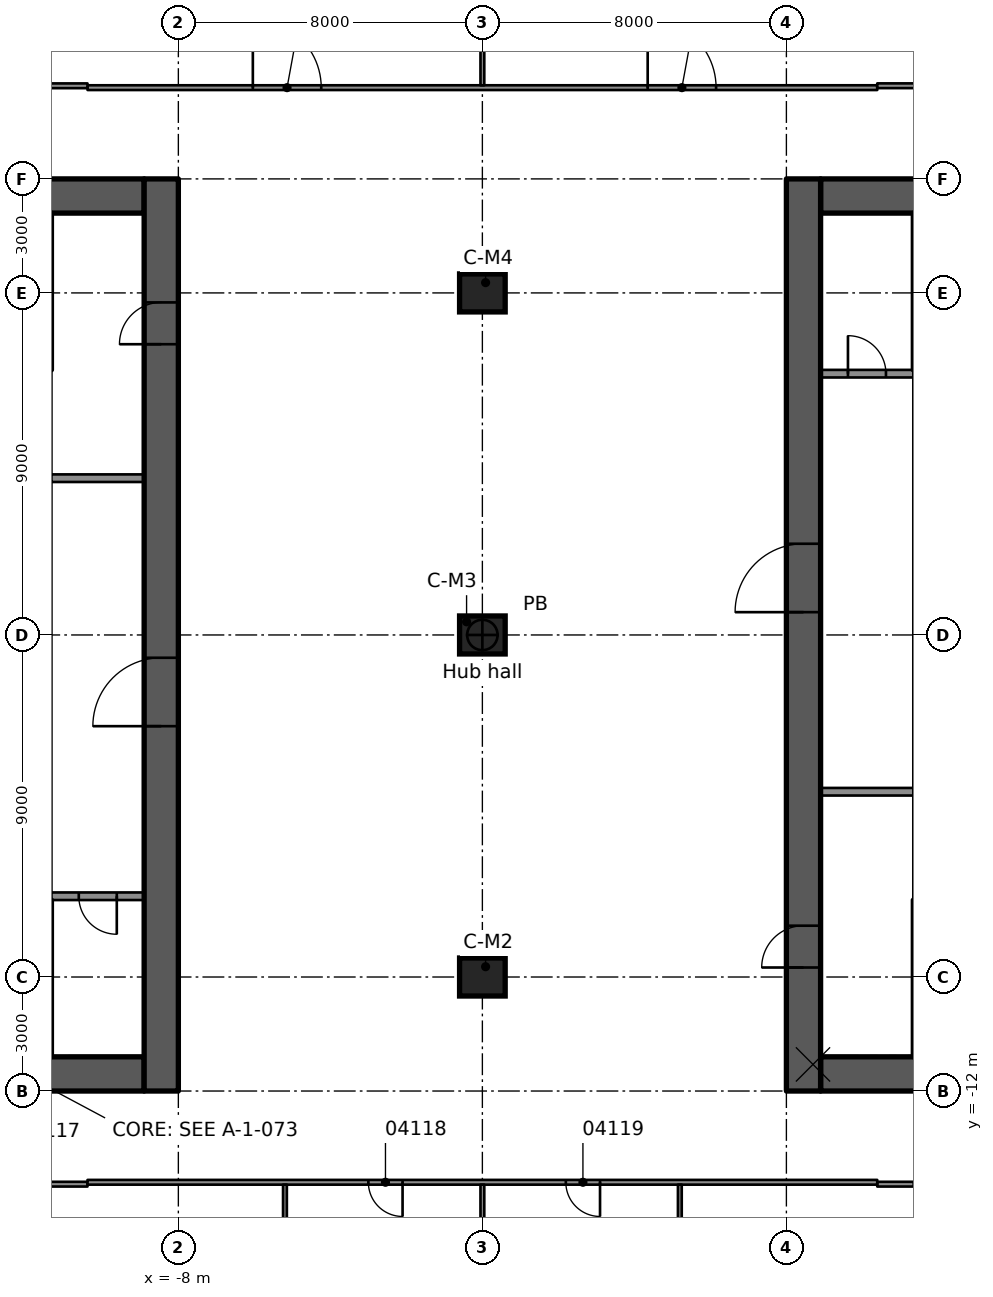
"""IFC4 building model, lengths in metres.
Left out: names, types, materials, properties, quantities, classifications, styles, units other than length and angle.
Written with IfcOpenShell. Run it as: python <this file> out.ifc"""

import sys

from ifc_helpers import new_model, si_unit, direction, frame, frame_2d, origin, origin_2d, place, context, subcontext, project, spatial, rectangle, extrude, element, fill, save


model = new_model("IFC4")
c1 = context("Model", 3, precision=1e-05, world=origin(), true_north=direction((0.0, 1.0)))
c2 = subcontext(c1, "Body", "Model", "MODEL_VIEW")
j1 = project(units=[si_unit("LENGTHUNIT", "METRE"), si_unit("PLANEANGLEUNIT", "RADIAN")], contexts=[c1])
p1 = place(None, origin())
s1 = spatial("IfcSite", under=j1, at=p1, CompositionType="ELEMENT")
p2 = place(p1, origin())
s2 = spatial("IfcBuilding", under=s1, at=p2, CompositionType="ELEMENT")
p3 = place(p2, frame((0.0, 0.0, 20.5)))
s3 = spatial("IfcBuildingStorey", under=s2, at=p3, CompositionType="ELEMENT", Elevation=20.5)
p4 = place(p3, frame((-18.1, 11.55, 0.0), z_axis=(0.0, 0.0, 1.0), x_axis=(1.0, 0.0, 0.0)))
e1 = element("IfcWall", 1, at=p4, inside=s3, PredefinedType="SHEAR", context=c2, shape_type="SweptSolid", body=[
    extrude(rectangle(XDim=9.2, YDim=0.9, at=frame_2d((4.6, 0.0))), origin(), (0.0, 0.0, 1.0), 4.6),
])
p5 = place(p4, frame((5.1, 0.0, 0.0)))
e2 = element("IfcOpeningElement", 2, at=p5, cuts=e1, PredefinedType="OPENING", context=c2, shape_type="SweptSolid", body=[
    extrude(rectangle(XDim=1.1, YDim=2.1, at=frame_2d((0.55, 1.05))), frame((0.0, 0.46, 0.0), z_axis=(0.0, -1.0, 0.0), x_axis=(1.0, 0.0, 0.0)), (0.0, 0.0, 1.0), 0.92),
])
p6 = place(p3, frame((-18.1, -11.55, 0.0), z_axis=(0.0, 0.0, 1.0), x_axis=(1.0, 0.0, 0.0)))
e3 = element("IfcWall", 3, at=p6, inside=s3, PredefinedType="SHEAR", context=c2, shape_type="SweptSolid", body=[
    extrude(rectangle(XDim=9.2, YDim=0.9, at=frame_2d((4.6, 0.0))), origin(), (0.0, 0.0, 1.0), 4.6),
])
p7 = place(p6, frame((5.1, 0.0, 0.0)))
e4 = element("IfcOpeningElement", 4, at=p7, cuts=e3, PredefinedType="OPENING", context=c2, shape_type="SweptSolid", body=[
    extrude(rectangle(XDim=1.1, YDim=2.1, at=frame_2d((0.55, 1.05))), frame((0.0, 0.46, 0.0), z_axis=(0.0, -1.0, 0.0), x_axis=(1.0, 0.0, 0.0)), (0.0, 0.0, 1.0), 0.92),
])
p8 = place(p3, frame((-8.45, -12.0, 0.0), z_axis=(0.0, 0.0, 1.0), x_axis=(0.0, 1.0, 0.0)))
e5 = element("IfcWall", 5, at=p8, inside=s3, PredefinedType="SHEAR", context=c2, shape_type="SweptSolid", body=[
    extrude(rectangle(XDim=24.0, YDim=0.9, at=frame_2d((12.0, 0.0))), origin(), (0.0, 0.0, 1.0), 4.6),
])
p9 = place(p8, frame((9.6, 0.0, 0.0)))
e6 = element("IfcOpeningElement", 6, at=p9, cuts=e5, PredefinedType="OPENING", context=c2, shape_type="SweptSolid", body=[
    extrude(rectangle(XDim=1.8, YDim=2.1, at=frame_2d((0.9, 1.05))), frame((0.0, 0.46, 0.0), z_axis=(0.0, -1.0, 0.0), x_axis=(1.0, 0.0, 0.0)), (0.0, 0.0, 1.0), 0.92),
])
p10 = place(p8, frame((19.65, 0.0, 0.0)))
e7 = element("IfcOpeningElement", 7, at=p10, cuts=e5, PredefinedType="OPENING", context=c2, shape_type="SweptSolid", body=[
    extrude(rectangle(XDim=1.1, YDim=2.1, at=frame_2d((0.55, 1.05))), frame((0.0, 0.46, 0.0), z_axis=(0.0, -1.0, 0.0), x_axis=(1.0, 0.0, 0.0)), (0.0, 0.0, 1.0), 0.92),
])
p11 = place(p3, frame((8.9, 11.55, 0.0), z_axis=(0.0, 0.0, 1.0), x_axis=(1.0, 0.0, 0.0)))
e8 = element("IfcWall", 8, at=p11, inside=s3, PredefinedType="SHEAR", context=c2, shape_type="SweptSolid", body=[
    extrude(rectangle(XDim=9.2, YDim=0.9, at=frame_2d((4.6, 0.0))), origin(), (0.0, 0.0, 1.0), 4.6),
])
p12 = place(p11, frame((3.0, 0.0, 0.0)))
e9 = element("IfcOpeningElement", 9, at=p12, cuts=e8, PredefinedType="OPENING", context=c2, shape_type="SweptSolid", body=[
    extrude(rectangle(XDim=1.1, YDim=2.1, at=frame_2d((0.55, 1.05))), frame((0.0, 0.46, 0.0), z_axis=(0.0, -1.0, 0.0), x_axis=(1.0, 0.0, 0.0)), (0.0, 0.0, 1.0), 0.92),
])
p13 = place(p3, frame((8.9, -11.55, 0.0), z_axis=(0.0, 0.0, 1.0), x_axis=(1.0, 0.0, 0.0)))
e10 = element("IfcWall", 10, at=p13, inside=s3, PredefinedType="SHEAR", context=c2, shape_type="SweptSolid", body=[
    extrude(rectangle(XDim=9.2, YDim=0.9, at=frame_2d((4.6, 0.0))), origin(), (0.0, 0.0, 1.0), 4.6),
])
p14 = place(p13, frame((3.0, 0.0, 0.0)))
e11 = element("IfcOpeningElement", 11, at=p14, cuts=e10, PredefinedType="OPENING", context=c2, shape_type="SweptSolid", body=[
    extrude(rectangle(XDim=1.1, YDim=2.1, at=frame_2d((0.55, 1.05))), frame((0.0, 0.46, 0.0), z_axis=(0.0, -1.0, 0.0), x_axis=(1.0, 0.0, 0.0)), (0.0, 0.0, 1.0), 0.92),
])
p15 = place(p3, frame((8.45, -12.0, 0.0), z_axis=(0.0, 0.0, 1.0), x_axis=(0.0, 1.0, 0.0)))
e12 = element("IfcWall", 12, at=p15, inside=s3, PredefinedType="SHEAR", context=c2, shape_type="SweptSolid", body=[
    extrude(rectangle(XDim=24.0, YDim=0.9, at=frame_2d((12.0, 0.0))), origin(), (0.0, 0.0, 1.0), 4.6),
])
p16 = place(p15, frame((12.6, 0.0, 0.0)))
e13 = element("IfcOpeningElement", 13, at=p16, cuts=e12, PredefinedType="OPENING", context=c2, shape_type="SweptSolid", body=[
    extrude(rectangle(XDim=1.8, YDim=2.1, at=frame_2d((0.9, 1.05))), frame((0.0, 0.46, 0.0), z_axis=(0.0, -1.0, 0.0), x_axis=(1.0, 0.0, 0.0)), (0.0, 0.0, 1.0), 0.92),
])
p17 = place(p15, frame((3.25, 0.0, 0.0)))
e14 = element("IfcOpeningElement", 14, at=p17, cuts=e12, PredefinedType="OPENING", context=c2, shape_type="SweptSolid", body=[
    extrude(rectangle(XDim=1.1, YDim=2.1, at=frame_2d((0.55, 1.05))), frame((0.0, 0.46, 0.0), z_axis=(0.0, -1.0, 0.0), x_axis=(1.0, 0.0, 0.0)), (0.0, 0.0, 1.0), 0.92),
])
for number, where, z_axis, x_axis in (
    (15, (0.0, -9.0, 0.0), (0.0, 0.0, 1.0), (1.0, 0.0, 0.0)),
    (16, (0.0, 0.0, 0.0), (0.0, 0.0, 1.0), (1.0, 0.0, 0.0)),
    (17, (0.0, 9.0, 0.0), (0.0, 0.0, 1.0), (1.0, 0.0, 0.0)),
):
    element("IfcColumn", number, at=place(p3, frame(where, z_axis=z_axis, x_axis=x_axis)), inside=s3, PredefinedType="COLUMN", context=c2, shape_type="SweptSolid", body=[
        extrude(rectangle(XDim=1.2, YDim=1.0, at=origin_2d()), origin(), (0.0, 0.0, 1.0), 4.6),
    ])
p18 = place(p3, frame((-8.9, 4.125, 0.0), z_axis=(0.0, 0.0, 1.0), x_axis=(-1.0, 0.0, 0.0)))
e18 = element("IfcWall", 18, at=p18, inside=s3, PredefinedType="PARTITIONING", context=c2, shape_type="SweptSolid", body=[
    extrude(rectangle(XDim=2.44, YDim=0.2, at=frame_2d((1.22, 0.0))), origin(), (0.0, 0.0, 1.0), 4.18),
])
p19 = place(p3, frame((-8.9, -6.875, 0.0), z_axis=(0.0, 0.0, 1.0), x_axis=(-1.0, 0.0, 0.0)))
e19 = element("IfcWall", 19, at=p19, inside=s3, PredefinedType="PARTITIONING", context=c2, shape_type="SweptSolid", body=[
    extrude(rectangle(XDim=2.44, YDim=0.2, at=frame_2d((1.22, 0.0))), origin(), (0.0, 0.0, 1.0), 4.18),
])
p20 = place(p19, frame((0.72, 0.0, 0.0)))
e20 = element("IfcOpeningElement", 20, at=p20, cuts=e19, PredefinedType="OPENING", context=c2, shape_type="SweptSolid", body=[
    extrude(rectangle(XDim=1.0, YDim=2.1, at=frame_2d((0.5, 1.05))), frame((0.0, 0.11, 0.0), z_axis=(0.0, -1.0, 0.0), x_axis=(1.0, 0.0, 0.0)), (0.0, 0.0, 1.0), 0.22),
])
p21 = place(p3, frame((8.9, -4.125, 0.0), z_axis=(0.0, 0.0, 1.0), x_axis=(1.0, 0.0, 0.0)))
e21 = element("IfcWall", 21, at=p21, inside=s3, PredefinedType="PARTITIONING", context=c2, shape_type="SweptSolid", body=[
    extrude(rectangle(XDim=2.44, YDim=0.2, at=frame_2d((1.22, 0.0))), origin(), (0.0, 0.0, 1.0), 4.18),
])
p22 = place(p3, frame((8.9, 6.875, 0.0), z_axis=(0.0, 0.0, 1.0), x_axis=(1.0, 0.0, 0.0)))
e22 = element("IfcWall", 22, at=p22, inside=s3, PredefinedType="PARTITIONING", context=c2, shape_type="SweptSolid", body=[
    extrude(rectangle(XDim=2.44, YDim=0.2, at=frame_2d((1.22, 0.0))), origin(), (0.0, 0.0, 1.0), 4.18),
])
p23 = place(p22, frame((0.72, 0.0, 0.0)))
e23 = element("IfcOpeningElement", 23, at=p23, cuts=e22, PredefinedType="OPENING", context=c2, shape_type="SweptSolid", body=[
    extrude(rectangle(XDim=1.0, YDim=2.1, at=frame_2d((0.5, 1.05))), frame((0.0, 0.11, 0.0), z_axis=(0.0, -1.0, 0.0), x_axis=(1.0, 0.0, 0.0)), (0.0, 0.0, 1.0), 0.22),
])
p24 = place(p3, frame((-10.391, -14.451, 0.0), z_axis=(0.0, 0.0, 1.0), x_axis=(-1.0, 0.0, 0.0)))
e24 = element("IfcWall", 24, at=p24, inside=s3, PredefinedType="PARTITIONING", context=c2, shape_type="SweptSolid", body=[
    extrude(rectangle(XDim=7.871, YDim=0.125, at=frame_2d((3.936, 0.0))), origin(), (0.0, 0.0, 1.0), 4.16),
])
p25 = place(p24, frame((5.209, 0.0, 0.0)))
e25 = element("IfcOpeningElement", 25, at=p25, cuts=e24, PredefinedType="OPENING", context=c2, shape_type="SweptSolid", body=[
    extrude(rectangle(XDim=1.1, YDim=2.1, at=frame_2d((0.55, 1.05))), frame((0.0, 0.073, 0.0), z_axis=(0.0, -1.0, 0.0), x_axis=(1.0, 0.0, 0.0)), (0.0, 0.0, 1.0), 0.145),
])
p26 = place(p24, frame((1.35, 0.0, 0.0)))
e26 = element("IfcOpeningElement", 26, at=p26, cuts=e24, PredefinedType="OPENING", context=c2, shape_type="SweptSolid", body=[
    extrude(rectangle(XDim=0.9, YDim=2.1, at=frame_2d((0.45, 1.05))), frame((0.0, 0.073, 0.0), z_axis=(0.0, -1.0, 0.0), x_axis=(1.0, 0.0, 0.0)), (0.0, 0.0, 1.0), 0.145),
])
p27 = place(p3, frame((21.387, -14.451, 0.0), z_axis=(0.0, 0.0, 1.0), x_axis=(-1.0, 0.0, 0.0)))
e27 = element("IfcWall", 27, at=p27, inside=s3, PredefinedType="PARTITIONING", context=c2, shape_type="SweptSolid", body=[
    extrude(rectangle(XDim=10.996, YDim=0.125, at=frame_2d((5.498, 0.0))), origin(), (0.0, 0.0, 1.0), 4.16),
])
p28 = place(p27, frame((8.238, 0.0, 0.0)))
e28 = element("IfcOpeningElement", 28, at=p28, cuts=e27, PredefinedType="OPENING", context=c2, shape_type="SweptSolid", body=[
    extrude(rectangle(XDim=1.8, YDim=2.1, at=frame_2d((0.9, 1.05))), frame((0.0, 0.073, 0.0), z_axis=(0.0, -1.0, 0.0), x_axis=(1.0, 0.0, 0.0)), (0.0, 0.0, 1.0), 0.145),
])
p29 = place(p27, frame((2.538, 0.0, 0.0)))
e29 = element("IfcOpeningElement", 29, at=p29, cuts=e27, PredefinedType="OPENING", context=c2, shape_type="SweptSolid", body=[
    extrude(rectangle(XDim=2.1, YDim=2.1, at=frame_2d((1.05, 1.05))), frame((0.0, 0.073, 0.0), z_axis=(0.0, -1.0, 0.0), x_axis=(1.0, 0.0, 0.0)), (0.0, 0.0, 1.0), 0.145),
])
p30 = place(p3, frame((10.391, -14.401, 0.0), z_axis=(0.0, 0.0, 1.0), x_axis=(-1.0, 0.0, 0.0)))
e30 = element("IfcWall", 30, at=p30, inside=s3, PredefinedType="PARTITIONING", context=c2, shape_type="SweptSolid", body=[
    extrude(rectangle(XDim=20.781, YDim=0.125, at=frame_2d((10.391, 0.0))), origin(), (0.0, 0.0, 1.0), 4.16),
])
p31 = place(p30, frame((12.491, 0.0, 0.0)))
e31 = element("IfcOpeningElement", 31, at=p31, cuts=e30, PredefinedType="OPENING", context=c2, shape_type="SweptSolid", body=[
    extrude(rectangle(XDim=0.9, YDim=2.1, at=frame_2d((0.45, 1.05))), frame((0.0, 0.073, 0.0), z_axis=(0.0, -1.0, 0.0), x_axis=(1.0, 0.0, 0.0)), (0.0, 0.0, 1.0), 0.145),
])
p32 = place(p30, frame((7.295, 0.0, 0.0)))
e32 = element("IfcOpeningElement", 32, at=p32, cuts=e30, PredefinedType="OPENING", context=c2, shape_type="SweptSolid", body=[
    extrude(rectangle(XDim=0.9, YDim=2.1, at=frame_2d((0.45, 1.05))), frame((0.0, 0.073, 0.0), z_axis=(0.0, -1.0, 0.0), x_axis=(1.0, 0.0, 0.0)), (0.0, 0.0, 1.0), 0.145),
])
p33 = place(p3, frame((-10.39, 14.401, 0.0), z_axis=(0.0, 0.0, 1.0), x_axis=(1.0, 0.0, 0.0)))
e33 = element("IfcWall", 33, at=p33, inside=s3, PredefinedType="PARTITIONING", context=c2, shape_type="SweptSolid", body=[
    extrude(rectangle(XDim=20.781, YDim=0.125, at=frame_2d((10.391, 0.0))), origin(), (0.0, 0.0, 1.0), 4.16),
])
p34 = place(p33, frame((14.74, 0.0, 0.0)))
e34 = element("IfcOpeningElement", 34, at=p34, cuts=e33, PredefinedType="OPENING", context=c2, shape_type="SweptSolid", body=[
    extrude(rectangle(XDim=1.8, YDim=2.1, at=frame_2d((0.9, 1.05))), frame((0.0, 0.073, 0.0), z_axis=(0.0, -1.0, 0.0), x_axis=(1.0, 0.0, 0.0)), (0.0, 0.0, 1.0), 0.145),
])
p35 = place(p33, frame((4.35, 0.0, 0.0)))
e35 = element("IfcOpeningElement", 35, at=p35, cuts=e33, PredefinedType="OPENING", context=c2, shape_type="SweptSolid", body=[
    extrude(rectangle(XDim=1.8, YDim=2.1, at=frame_2d((0.9, 1.05))), frame((0.0, 0.073, 0.0), z_axis=(0.0, -1.0, 0.0), x_axis=(1.0, 0.0, 0.0)), (0.0, 0.0, 1.0), 0.145),
])
p36 = place(p3, frame((-24.731, 14.45, 0.0), z_axis=(0.0, 0.0, 1.0), x_axis=(1.0, 0.0, 0.0)))
e36 = element("IfcWall", 36, at=p36, inside=s3, PredefinedType="PARTITIONING", context=c2, shape_type="SweptSolid", body=[
    extrude(rectangle(XDim=14.34, YDim=0.125, at=frame_2d((7.17, 0.0))), origin(), (0.0, 0.0, 1.0), 4.16),
])
p37 = place(p3, frame((10.391, 14.451, 0.0), z_axis=(0.0, 0.0, 1.0), x_axis=(1.0, 0.0, 0.0)))
e37 = element("IfcWall", 37, at=p37, inside=s3, PredefinedType="PARTITIONING", context=c2, shape_type="SweptSolid", body=[
    extrude(rectangle(XDim=10.996, YDim=0.125, at=frame_2d((5.498, 0.0))), origin(), (0.0, 0.0, 1.0), 4.16),
])
for number, where, z_axis, x_axis in (
    (38, (5.196, -30.25, 0.0), (0.0, 0.0, 1.0), (0.0, 1.0, 0.0)),
    (39, (0.0, -30.25, 0.0), (0.0, 0.0, 1.0), (0.0, 1.0, 0.0)),
    (40, (0.0, 14.463, 0.0), (0.0, 0.0, 1.0), (0.0, 1.0, 0.0)),
    (41, (-5.195, -30.25, 0.0), (0.0, 0.0, 1.0), (0.0, 1.0, 0.0)),
):
    element("IfcWall", number, at=place(p3, frame(where, z_axis=z_axis, x_axis=x_axis)), inside=s3, PredefinedType="PARTITIONING", context=c2, shape_type="SweptSolid", body=[
        extrude(rectangle(XDim=15.787, YDim=0.1, at=frame_2d((7.894, 0.0))), origin(), (0.0, 0.0, 1.0), 4.16),
    ])
p38 = place(p9, origin())
e42 = element("IfcDoor", 42, at=p38, inside=s3, OperationType="SINGLE_SWING_LEFT", PredefinedType="DOOR", context=c2, shape_type="SweptSolid", body=[
    extrude(rectangle(XDim=1.8, YDim=2.1, at=frame_2d((0.9, 1.05))), frame((0.0, 0.025, 0.0), z_axis=(0.0, -1.0, 0.0), x_axis=(1.0, 0.0, 0.0)), (0.0, 0.0, 1.0), 0.05),
])
fill(e6, e42)
p39 = place(p10, origin())
e43 = element("IfcDoor", 43, at=p39, inside=s3, OperationType="SINGLE_SWING_RIGHT", PredefinedType="DOOR", context=c2, shape_type="SweptSolid", body=[
    extrude(rectangle(XDim=1.1, YDim=2.1, at=frame_2d((0.55, 1.05))), frame((0.0, 0.025, 0.0), z_axis=(0.0, -1.0, 0.0), x_axis=(1.0, 0.0, 0.0)), (0.0, 0.0, 1.0), 0.05),
])
fill(e7, e43)
p40 = place(p20, origin())
e44 = element("IfcDoor", 44, at=p40, inside=s3, OperationType="SINGLE_SWING_RIGHT", PredefinedType="DOOR", context=c2, shape_type="SweptSolid", body=[
    extrude(rectangle(XDim=1.0, YDim=2.1, at=frame_2d((0.5, 1.05))), frame((0.0, 0.025, 0.0), z_axis=(0.0, -1.0, 0.0), x_axis=(1.0, 0.0, 0.0)), (0.0, 0.0, 1.0), 0.05),
])
fill(e20, e44)
p41 = place(p16, origin())
e45 = element("IfcDoor", 45, at=p41, inside=s3, OperationType="SINGLE_SWING_RIGHT", PredefinedType="DOOR", context=c2, shape_type="SweptSolid", body=[
    extrude(rectangle(XDim=1.8, YDim=2.1, at=frame_2d((0.9, 1.05))), frame((0.0, 0.025, 0.0), z_axis=(0.0, -1.0, 0.0), x_axis=(1.0, 0.0, 0.0)), (0.0, 0.0, 1.0), 0.05),
])
fill(e13, e45)
p42 = place(p17, origin())
e46 = element("IfcDoor", 46, at=p42, inside=s3, OperationType="SINGLE_SWING_LEFT", PredefinedType="DOOR", context=c2, shape_type="SweptSolid", body=[
    extrude(rectangle(XDim=1.1, YDim=2.1, at=frame_2d((0.55, 1.05))), frame((0.0, 0.025, 0.0), z_axis=(0.0, -1.0, 0.0), x_axis=(1.0, 0.0, 0.0)), (0.0, 0.0, 1.0), 0.05),
])
fill(e14, e46)
p43 = place(p23, origin())
e47 = element("IfcDoor", 47, at=p43, inside=s3, OperationType="SINGLE_SWING_RIGHT", PredefinedType="DOOR", context=c2, shape_type="SweptSolid", body=[
    extrude(rectangle(XDim=1.0, YDim=2.1, at=frame_2d((0.5, 1.05))), frame((0.0, 0.025, 0.0), z_axis=(0.0, -1.0, 0.0), x_axis=(1.0, 0.0, 0.0)), (0.0, 0.0, 1.0), 0.05),
])
fill(e23, e47)
p44 = place(p31, origin())
e48 = element("IfcDoor", 48, at=p44, inside=s3, OperationType="SINGLE_SWING_RIGHT", PredefinedType="DOOR", context=c2, shape_type="SweptSolid", body=[
    extrude(rectangle(XDim=0.9, YDim=2.1, at=frame_2d((0.45, 1.05))), frame((0.0, 0.025, 0.0), z_axis=(0.0, -1.0, 0.0), x_axis=(1.0, 0.0, 0.0)), (0.0, 0.0, 1.0), 0.05),
])
fill(e31, e48)
p45 = place(p32, origin())
e49 = element("IfcDoor", 49, at=p45, inside=s3, OperationType="SINGLE_SWING_LEFT", PredefinedType="DOOR", context=c2, shape_type="SweptSolid", body=[
    extrude(rectangle(XDim=0.9, YDim=2.1, at=frame_2d((0.45, 1.05))), frame((0.0, 0.025, 0.0), z_axis=(0.0, -1.0, 0.0), x_axis=(1.0, 0.0, 0.0)), (0.0, 0.0, 1.0), 0.05),
])
fill(e32, e49)
p46 = place(p34, origin())
e50 = element("IfcDoor", 50, at=p46, inside=s3, OperationType="DOUBLE_DOOR_SINGLE_SWING", PredefinedType="DOOR", context=c2, shape_type="SweptSolid", body=[
    extrude(rectangle(XDim=1.8, YDim=2.1, at=frame_2d((0.9, 1.05))), frame((0.0, 0.025, 0.0), z_axis=(0.0, -1.0, 0.0), x_axis=(1.0, 0.0, 0.0)), (0.0, 0.0, 1.0), 0.05),
])
fill(e34, e50)
p47 = place(p35, origin())
e51 = element("IfcDoor", 51, at=p47, inside=s3, OperationType="DOUBLE_DOOR_SINGLE_SWING", PredefinedType="DOOR", context=c2, shape_type="SweptSolid", body=[
    extrude(rectangle(XDim=1.8, YDim=2.1, at=frame_2d((0.9, 1.05))), frame((0.0, 0.025, 0.0), z_axis=(0.0, -1.0, 0.0), x_axis=(1.0, 0.0, 0.0)), (0.0, 0.0, 1.0), 0.05),
])
fill(e35, e51)
save(model, sys.argv[1])
